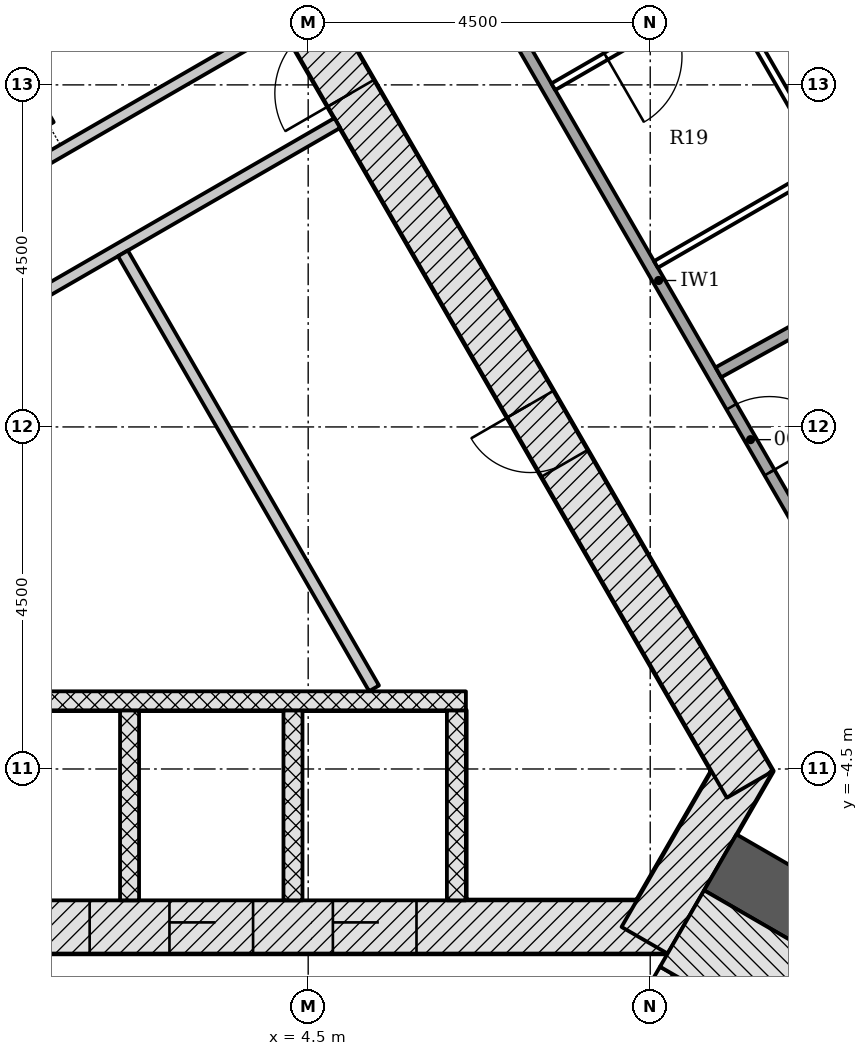
"""IFC4 building model, lengths in metres.
Left out: names, types, materials, properties, quantities, classifications, styles, units other than length and angle.
Written with IfcOpenShell. Run it as: python <this file> out.ifc"""

import sys

from ifc_helpers import new_model, si_unit, direction, frame, frame_2d, origin, place, context, subcontext, project, spatial, rectangle, extrude, element, fill, save


model = new_model("IFC4")
c1 = context("Model", 3, precision=1e-05, world=origin(), true_north=direction((0.0, 1.0)))
c2 = subcontext(c1, "Body", "Model", "MODEL_VIEW")
j1 = project(units=[si_unit("LENGTHUNIT", "METRE"), si_unit("PLANEANGLEUNIT", "RADIAN")], contexts=[c1])
p1 = place(None, origin())
s1 = spatial("IfcSite", under=j1, at=p1, CompositionType="ELEMENT")
p2 = place(p1, origin())
s2 = spatial("IfcBuilding", under=s1, at=p2, CompositionType="ELEMENT")
p3 = place(p2, frame((0.0, 0.0, 45.6)))
s3 = spatial("IfcBuildingStorey", under=s2, at=p3, CompositionType="ELEMENT", Elevation=45.6)
p4 = place(p3, frame((-9.229, -6.578, -0.2), z_axis=(0.0, 0.0, 1.0), x_axis=(1.0, 0.0, 0.0)))
e1 = element("IfcWall", 1, at=p4, inside=s3, PredefinedType="SHEAR", context=c2, shape_type="SweptSolid", body=[
    extrude(rectangle(XDim=18.458, YDim=0.7, at=frame_2d((9.229, 0.0))), origin(), (0.0, 0.0, 1.0), 3.6),
])
p5 = place(p4, frame((3.304, 0.0, 0.2)))
e2 = element("IfcOpeningElement", 2, at=p5, cuts=e1, PredefinedType="OPENING", context=c2, shape_type="SweptSolid", body=[
    extrude(rectangle(XDim=1.1, YDim=2.1, at=frame_2d((0.55, 1.05))), frame((0.0, 0.36, 0.0), z_axis=(0.0, -1.0, 0.0), x_axis=(1.0, 0.0, 0.0)), (0.0, 0.0, 1.0), 0.72),
])
p6 = place(p4, frame((5.454, 0.0, 0.2)))
e3 = element("IfcOpeningElement", 3, at=p6, cuts=e1, PredefinedType="OPENING", context=c2, shape_type="SweptSolid", body=[
    extrude(rectangle(XDim=1.1, YDim=2.1, at=frame_2d((0.55, 1.05))), frame((0.0, 0.36, 0.0), z_axis=(0.0, -1.0, 0.0), x_axis=(1.0, 0.0, 0.0)), (0.0, 0.0, 1.0), 0.72),
])
p7 = place(p4, frame((7.604, 0.0, 0.2)))
e4 = element("IfcOpeningElement", 4, at=p7, cuts=e1, PredefinedType="OPENING", context=c2, shape_type="SweptSolid", body=[
    extrude(rectangle(XDim=1.1, YDim=2.1, at=frame_2d((0.55, 1.05))), frame((0.0, 0.36, 0.0), z_axis=(0.0, -1.0, 0.0), x_axis=(1.0, 0.0, 0.0)), (0.0, 0.0, 1.0), 0.72),
])
p8 = place(p4, frame((9.754, 0.0, 0.2)))
e5 = element("IfcOpeningElement", 5, at=p8, cuts=e1, PredefinedType="OPENING", context=c2, shape_type="SweptSolid", body=[
    extrude(rectangle(XDim=1.1, YDim=2.1, at=frame_2d((0.55, 1.05))), frame((0.0, 0.36, 0.0), z_axis=(0.0, -1.0, 0.0), x_axis=(1.0, 0.0, 0.0)), (0.0, 0.0, 1.0), 0.72),
])
p9 = place(p4, frame((11.904, 0.0, 0.2)))
e6 = element("IfcOpeningElement", 6, at=p9, cuts=e1, PredefinedType="OPENING", context=c2, shape_type="SweptSolid", body=[
    extrude(rectangle(XDim=1.1, YDim=2.1, at=frame_2d((0.55, 1.05))), frame((0.0, 0.36, 0.0), z_axis=(0.0, -1.0, 0.0), x_axis=(1.0, 0.0, 0.0)), (0.0, 0.0, 1.0), 0.72),
])
p10 = place(p4, frame((14.054, 0.0, 0.2)))
e7 = element("IfcOpeningElement", 7, at=p10, cuts=e1, PredefinedType="OPENING", context=c2, shape_type="SweptSolid", body=[
    extrude(rectangle(XDim=1.1, YDim=2.1, at=frame_2d((0.55, 1.05))), frame((0.0, 0.36, 0.0), z_axis=(0.0, -1.0, 0.0), x_axis=(1.0, 0.0, 0.0)), (0.0, 0.0, 1.0), 0.72),
])
p11 = place(p4, frame((1.029, 0.0, 0.2)))
e8 = element("IfcOpeningElement", 8, at=p11, cuts=e1, PredefinedType="OPENING", context=c2, shape_type="SweptSolid", body=[
    extrude(rectangle(XDim=1.0, YDim=2.1, at=frame_2d((0.5, 1.05))), frame((0.0, 0.36, 0.0), z_axis=(0.0, -1.0, 0.0), x_axis=(1.0, 0.0, 0.0)), (0.0, 0.0, 1.0), 0.72),
])
p12 = place(p3, frame((8.926, -6.753, -0.2), z_axis=(0.0, 0.0, 1.0), x_axis=(0.500042739161, 0.866000726912, 0.0)))
e9 = element("IfcWall", 9, at=p12, inside=s3, PredefinedType="SHEAR", context=c2, shape_type="SweptSolid", body=[
    extrude(rectangle(XDim=2.771, YDim=0.7, at=frame_2d((1.386, 0.0))), origin(), (0.0, 0.0, 1.0), 3.6),
])
p13 = place(p3, frame((10.311, -4.703, -0.2), z_axis=(0.0, 0.0, 1.0), x_axis=(-0.500001446645, 0.866024568562, 0.0)))
e10 = element("IfcWall", 10, at=p13, inside=s3, PredefinedType="SHEAR", context=c2, shape_type="SweptSolid", body=[
    extrude(rectangle(XDim=18.458, YDim=0.7, at=frame_2d((9.229, 0.0))), origin(), (0.0, 0.0, 1.0), 3.6),
])
p14 = place(p13, frame((10.5, 0.0, 0.2)))
e11 = element("IfcOpeningElement", 11, at=p14, cuts=e10, PredefinedType="OPENING", context=c2, shape_type="SweptSolid", body=[
    extrude(rectangle(XDim=1.0, YDim=2.1, at=frame_2d((0.5, 1.05))), frame((0.0, 0.36, 0.0), z_axis=(0.0, -1.0, 0.0), x_axis=(1.0, 0.0, 0.0)), (0.0, 0.0, 1.0), 0.72),
])
p15 = place(p13, frame((4.877, 0.0, 0.2)))
e12 = element("IfcOpeningElement", 12, at=p15, cuts=e10, PredefinedType="OPENING", context=c2, shape_type="SweptSolid", body=[
    extrude(rectangle(XDim=0.9, YDim=2.1, at=frame_2d((0.45, 1.05))), frame((0.0, 0.36, 0.0), z_axis=(0.0, -1.0, 0.0), x_axis=(1.0, 0.0, 0.0)), (0.0, 0.0, 1.0), 0.72),
])
p16 = place(p13, frame((14.452, 0.0, 0.2)))
e13 = element("IfcOpeningElement", 13, at=p16, cuts=e10, PredefinedType="OPENING", context=c2, shape_type="SweptSolid", body=[
    extrude(rectangle(XDim=0.9, YDim=2.1, at=frame_2d((0.45, 1.05))), frame((0.0, 0.36, 0.0), z_axis=(0.0, -1.0, 0.0), x_axis=(1.0, 0.0, 0.0)), (0.0, 0.0, 1.0), 0.72),
])
p17 = place(p3, frame((9.922, -5.728, -0.2), z_axis=(0.0, 0.0, 1.0), x_axis=(0.866021666006, -0.500006473966, 0.0)))
e14 = element("IfcWall", 14, at=p17, inside=s3, PredefinedType="SHEAR", context=c2, shape_type="SweptSolid", body=[
    extrude(rectangle(XDim=14.013, YDim=0.85, at=frame_2d((7.007, 0.0))), origin(), (0.0, 0.0, 1.0), 3.6),
])
for number, where, z_axis, x_axis in (
    (15, (2.15, -6.228, -0.2), (0.0, 0.0, 1.0), (0.0, 1.0, 0.0)),
    (16, (4.3, -6.228, -0.2), (0.0, 0.0, 1.0), (0.0, 1.0, 0.0)),
    (17, (6.45, -6.228, -0.2), (0.0, 0.0, 1.0), (0.0, 1.0, 0.0)),
):
    element("IfcWall", number, at=place(p3, frame(where, z_axis=z_axis, x_axis=x_axis)), inside=s3, PredefinedType="PARTITIONING", context=c2, shape_type="SweptSolid", body=[
        extrude(rectangle(XDim=2.5, YDim=0.25, at=frame_2d((1.25, 0.0))), origin(), (0.0, 0.0, 1.0), 3.6),
    ])
p18 = place(p3, frame((-6.575, -3.603, 0.0), z_axis=(0.0, 0.0, 1.0), x_axis=(1.0, 0.0, 0.0)))
e18 = element("IfcWall", 18, at=p18, inside=s3, PredefinedType="PARTITIONING", context=c2, shape_type="SweptSolid", body=[
    extrude(rectangle(XDim=13.15, YDim=0.25, at=frame_2d((6.575, 0.0))), origin(), (0.0, 0.0, 1.0), 3.4),
])
p19 = place(p3, frame((-4.198, -1.244, 0.0), z_axis=(0.0, 0.0, 1.0), x_axis=(0.866020798945, 0.500007975732, 0.0)))
e19 = element("IfcWall", 19, at=p19, inside=s3, PredefinedType="PARTITIONING", context=c2, shape_type="SweptSolid", body=[
    extrude(rectangle(XDim=10.486, YDim=0.15, at=frame_2d((5.243, 0.0))), origin(), (0.0, 0.0, 1.0), 3.4),
])
p20 = place(p19, frame((3.736, 0.0, 0.0)))
e20 = element("IfcOpeningElement", 20, at=p20, cuts=e19, PredefinedType="OPENING", context=c2, shape_type="SweptSolid", body=[
    extrude(rectangle(XDim=0.9, YDim=2.1, at=frame_2d((0.45, 1.05))), frame((0.0, 0.085, 0.0), z_axis=(0.0, -1.0, 0.0), x_axis=(1.0, 0.0, 0.0)), (0.0, 0.0, 1.0), 0.17),
])
p21 = place(p19, frame((0.144, 0.0, 0.0)))
e21 = element("IfcOpeningElement", 21, at=p21, cuts=e19, PredefinedType="OPENING", context=c2, shape_type="SweptSolid", body=[
    extrude(rectangle(XDim=0.9, YDim=2.1, at=frame_2d((0.45, 1.05))), frame((0.0, 0.085, 0.0), z_axis=(0.0, -1.0, 0.0), x_axis=(1.0, 0.0, 0.0)), (0.0, 0.0, 1.0), 0.17),
])
p22 = place(p3, frame((5.367, -3.439, 0.0), z_axis=(0.0, 0.0, 1.0), x_axis=(-0.499981499682, 0.866036084685, 0.0)))
e22 = element("IfcWall", 22, at=p22, inside=s3, PredefinedType="PARTITIONING", context=c2, shape_type="SweptSolid", body=[
    extrude(rectangle(XDim=6.608, YDim=0.15, at=frame_2d((3.304, 0.0))), origin(), (0.0, 0.0, 1.0), 3.4),
])
p23 = place(p3, frame((-2.698, 1.354, 0.0), z_axis=(0.0, 0.0, 1.0), x_axis=(0.866021157486, 0.500007354732, 0.0)))
e23 = element("IfcWall", 23, at=p23, inside=s3, PredefinedType="PARTITIONING", context=c2, shape_type="SweptSolid", body=[
    extrude(rectangle(XDim=7.888, YDim=0.15, at=frame_2d((3.944, 0.0))), origin(), (0.0, 0.0, 1.0), 3.4),
])
p24 = place(p23, frame((1.845, 0.0, 0.0)))
e24 = element("IfcOpeningElement", 24, at=p24, cuts=e23, PredefinedType="OPENING", context=c2, shape_type="SweptSolid", body=[
    extrude(rectangle(XDim=0.9, YDim=2.1, at=frame_2d((0.45, 1.05))), frame((0.0, 0.085, 0.0), z_axis=(0.0, -1.0, 0.0), x_axis=(1.0, 0.0, 0.0)), (0.0, 0.0, 1.0), 0.17),
])
p25 = place(p3, frame((1.088, 3.972, 0.0), z_axis=(0.0, 0.0, 1.0), x_axis=(-0.500116913307, 0.865957893332, 0.0)))
e25 = element("IfcWall", 25, at=p25, inside=s3, PredefinedType="PARTITIONING", context=c2, shape_type="SweptSolid", body=[
    extrude(rectangle(XDim=2.304, YDim=0.15, at=frame_2d((1.152, 0.0))), origin(), (0.0, 0.0, 1.0), 3.4),
])
p26 = place(p3, frame((7.44, -10.226, -0.2), z_axis=(0.0, 0.0, 1.0), x_axis=(0.500022077904, 0.866012656725, 0.0)))
e26 = element("IfcWall", 26, at=p26, inside=s3, PredefinedType="SHEAR", context=c2, shape_type="SweptSolid", body=[
    extrude(rectangle(XDim=3.55, YDim=0.2, at=frame_2d((1.775, 0.0))), origin(), (0.0, 0.0, 1.0), 3.6),
])
p27 = place(p26, frame((1.175, 0.0, 0.2)))
e27 = element("IfcOpeningElement", 27, at=p27, cuts=e26, PredefinedType="OPENING", context=c2, shape_type="SweptSolid", body=[
    extrude(rectangle(XDim=1.2, YDim=2.1, at=frame_2d((0.6, 1.05))), frame((0.0, 0.11, 0.0), z_axis=(0.0, -1.0, 0.0), x_axis=(1.0, 0.0, 0.0)), (0.0, 0.0, 1.0), 0.22),
])
p28 = place(p3, frame((9.419, -6.599, -0.2), z_axis=(0.0, 0.0, 1.0), x_axis=(0.866033125095, -0.499986626058, 0.0)))
e28 = element("IfcWall", 28, at=p28, inside=s3, PredefinedType="SHEAR", context=c2, shape_type="SweptSolid", body=[
    extrude(rectangle(XDim=7.2, YDim=1.161, at=frame_2d((3.6, 0.0))), origin(), (0.0, 0.0, 1.0), 3.6),
])
p29 = place(p3, frame((5.346, 8.446, 0.0), z_axis=(0.0, 0.0, 1.0), x_axis=(0.500008781656, -0.866020333634, 0.0)))
e29 = element("IfcWall", 29, at=p29, inside=s3, PredefinedType="PARTITIONING", context=c2, shape_type="SweptSolid", body=[
    extrude(rectangle(XDim=15.057, YDim=0.15, at=frame_2d((7.528, 0.0))), origin(), (0.0, 0.0, 1.0), 2.778),
])
p30 = place(p29, frame((9.446, 0.0, 0.0)))
e30 = element("IfcOpeningElement", 30, at=p30, cuts=e29, PredefinedType="OPENING", context=c2, shape_type="SweptSolid", body=[
    extrude(rectangle(XDim=1.0, YDim=2.1, at=frame_2d((0.5, 1.05))), frame((0.0, 0.085, 0.0), z_axis=(0.0, -1.0, 0.0), x_axis=(1.0, 0.0, 0.0)), (0.0, 0.0, 1.0), 0.17),
])
p31 = place(p29, frame((1.892, 0.0, 0.0)))
e31 = element("IfcOpeningElement", 31, at=p31, cuts=e29, PredefinedType="OPENING", context=c2, shape_type="SweptSolid", body=[
    extrude(rectangle(XDim=1.0, YDim=2.1, at=frame_2d((0.5, 1.05))), frame((0.0, 0.085, 0.0), z_axis=(0.0, -1.0, 0.0), x_axis=(1.0, 0.0, 0.0)), (0.0, 0.0, 1.0), 0.17),
])
p32 = place(p3, frame((17.215, 4.76, 0.0), z_axis=(0.0, 0.0, 1.0), x_axis=(-0.875336511681, -0.483514210048, 0.0)))
e32 = element("IfcWall", 32, at=p32, inside=s3, PredefinedType="PARTITIONING", context=c2, shape_type="SweptSolid", body=[
    extrude(rectangle(XDim=8.361, YDim=0.15, at=frame_2d((4.18, 0.0))), origin(), (0.0, 0.0, 1.0), 2.778),
])
p33 = place(p3, frame((15.002, 8.677, 0.0), z_axis=(0.0, 0.0, 1.0), x_axis=(-0.866019139798, -0.500010849386, 0.0)))
e33 = element("IfcWall", 33, at=p33, inside=s3, PredefinedType="PARTITIONING", context=c2, shape_type="SweptSolid", body=[
    extrude(rectangle(XDim=8.403, YDim=0.1, at=frame_2d((4.201, 0.0))), origin(), (0.0, 0.0, 1.0), 2.778),
])
p34 = place(p33, frame((6.603, 0.0, 0.0)))
e34 = element("IfcOpeningElement", 34, at=p34, cuts=e33, PredefinedType="OPENING", context=c2, shape_type="SweptSolid", body=[
    extrude(rectangle(XDim=1.0, YDim=2.1, at=frame_2d((0.5, 1.05))), frame((0.0, 0.06, 0.0), z_axis=(0.0, -1.0, 0.0), x_axis=(1.0, 0.0, 0.0)), (0.0, 0.0, 1.0), 0.12),
])
p35 = place(p33, frame((1.9, 0.0, 0.0)))
e35 = element("IfcOpeningElement", 35, at=p35, cuts=e33, PredefinedType="OPENING", context=c2, shape_type="SweptSolid", body=[
    extrude(rectangle(XDim=1.0, YDim=2.1, at=frame_2d((0.5, 1.05))), frame((0.0, 0.06, 0.0), z_axis=(0.0, -1.0, 0.0), x_axis=(1.0, 0.0, 0.0)), (0.0, 0.0, 1.0), 0.12),
])
p36 = place(p3, frame((10.002, 5.732, 0.0), z_axis=(0.0, 0.0, 1.0), x_axis=(0.499993606316, -0.866029095148, 0.0)))
e36 = element("IfcWall", 36, at=p36, inside=s3, PredefinedType="PARTITIONING", context=c2, shape_type="SweptSolid", body=[
    extrude(rectangle(XDim=2.65, YDim=0.1, at=frame_2d((1.325, 0.0))), origin(), (0.0, 0.0, 1.0), 2.778),
])
p37 = place(p3, frame((11.284, 3.413, 0.0), z_axis=(0.0, 0.0, 1.0), x_axis=(-0.866054858364, -0.499948979701, 0.0)))
e37 = element("IfcWall", 37, at=p37, inside=s3, PredefinedType="PARTITIONING", context=c2, shape_type="SweptSolid", body=[
    extrude(rectangle(XDim=2.55, YDim=0.1, at=frame_2d((1.275, 0.0))), origin(), (0.0, 0.0, 1.0), 3.4),
])
p38 = place(p8, origin())
e38 = element("IfcDoor", 38, at=p38, inside=s3, OperationType="DOUBLE_DOOR_SLIDING", PredefinedType="DOOR", context=c2, shape_type="SweptSolid", body=[
    extrude(rectangle(XDim=1.1, YDim=2.1, at=frame_2d((0.55, 1.05))), frame((0.0, 0.025, 0.0), z_axis=(0.0, -1.0, 0.0), x_axis=(1.0, 0.0, 0.0)), (0.0, 0.0, 1.0), 0.05),
])
fill(e5, e38)
p39 = place(p9, origin())
e39 = element("IfcDoor", 39, at=p39, inside=s3, OperationType="DOUBLE_DOOR_SLIDING", PredefinedType="DOOR", context=c2, shape_type="SweptSolid", body=[
    extrude(rectangle(XDim=1.1, YDim=2.1, at=frame_2d((0.55, 1.05))), frame((0.0, 0.025, 0.0), z_axis=(0.0, -1.0, 0.0), x_axis=(1.0, 0.0, 0.0)), (0.0, 0.0, 1.0), 0.05),
])
fill(e6, e39)
p40 = place(p10, origin())
e40 = element("IfcDoor", 40, at=p40, inside=s3, OperationType="DOUBLE_DOOR_SLIDING", PredefinedType="DOOR", context=c2, shape_type="SweptSolid", body=[
    extrude(rectangle(XDim=1.1, YDim=2.1, at=frame_2d((0.55, 1.05))), frame((0.0, 0.025, 0.0), z_axis=(0.0, -1.0, 0.0), x_axis=(1.0, 0.0, 0.0)), (0.0, 0.0, 1.0), 0.05),
])
fill(e7, e40)
p41 = place(p14, origin())
e41 = element("IfcDoor", 41, at=p41, inside=s3, OperationType="SINGLE_SWING_LEFT", PredefinedType="DOOR", context=c2, shape_type="SweptSolid", body=[
    extrude(rectangle(XDim=1.0, YDim=2.1, at=frame_2d((0.5, 1.05))), frame((0.0, 0.075, 0.0), z_axis=(0.0, -1.0, 0.0), x_axis=(1.0, 0.0, 0.0)), (0.0, 0.0, 1.0), 0.15),
])
fill(e11, e41)
p42 = place(p15, origin())
e42 = element("IfcDoor", 42, at=p42, inside=s3, OperationType="SINGLE_SWING_RIGHT", PredefinedType="DOOR", context=c2, shape_type="SweptSolid", body=[
    extrude(rectangle(XDim=0.9, YDim=2.1, at=frame_2d((0.45, 1.05))), frame((0.0, 0.075, 0.0), z_axis=(0.0, -1.0, 0.0), x_axis=(1.0, 0.0, 0.0)), (0.0, 0.0, 1.0), 0.15),
])
fill(e12, e42)
p43 = place(p30, origin())
e43 = element("IfcDoor", 43, at=p43, inside=s3, OperationType="SINGLE_SWING_RIGHT", PredefinedType="DOOR", context=c2, shape_type="SweptSolid", body=[
    extrude(rectangle(XDim=1.0, YDim=2.1, at=frame_2d((0.5, 1.05))), frame((0.0, 0.025, 0.0), z_axis=(0.0, -1.0, 0.0), x_axis=(1.0, 0.0, 0.0)), (0.0, 0.0, 1.0), 0.05),
])
fill(e30, e43)
p44 = place(p34, origin())
e44 = element("IfcDoor", 44, at=p44, inside=s3, OperationType="SINGLE_SWING_RIGHT", PredefinedType="DOOR", context=c2, shape_type="SweptSolid", body=[
    extrude(rectangle(XDim=1.0, YDim=2.1, at=frame_2d((0.5, 1.05))), frame((0.0, 0.025, 0.0), z_axis=(0.0, -1.0, 0.0), x_axis=(1.0, 0.0, 0.0)), (0.0, 0.0, 1.0), 0.05),
])
fill(e34, e44)
save(model, sys.argv[1])
